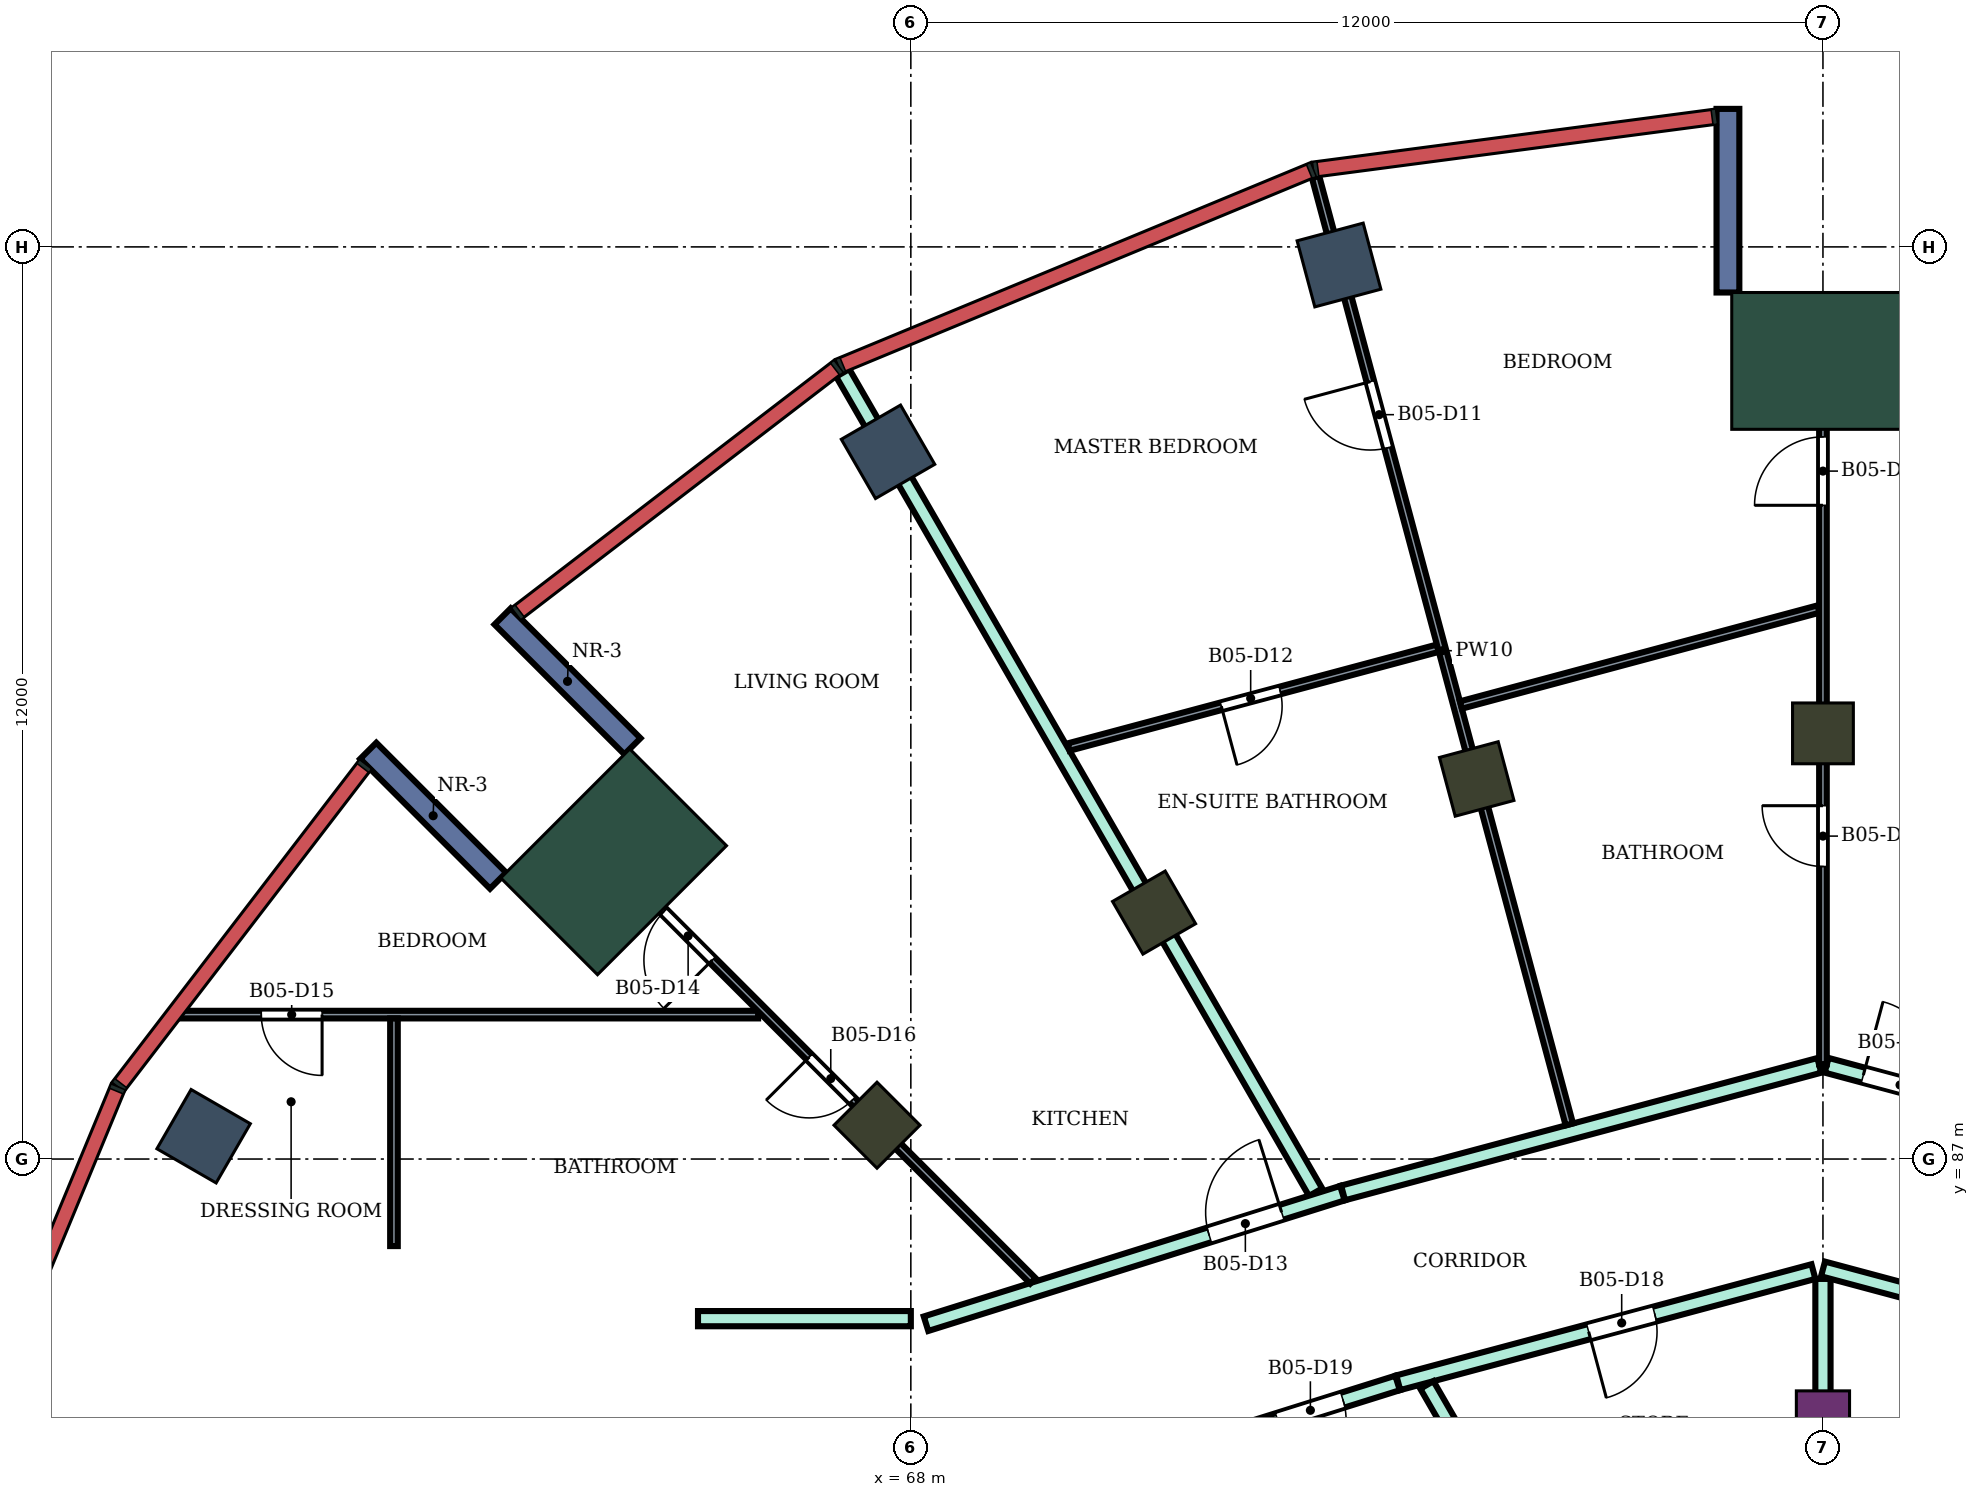
"""IFC4 building model, lengths in metres.
Left out: names, types, materials, properties, quantities, classifications, styles, units other than length and angle.
Written with IfcOpenShell. Run it as: python <this file> out.ifc"""

import sys

from ifc_helpers import new_model, si_unit, direction, frame, frame_2d, origin, origin_2d, place, context, subcontext, project, spatial, rectangle, extrude, element, fill, save


model = new_model("IFC4")
c1 = context("Model", 3, precision=1e-05, world=origin(), true_north=direction((0.0, 1.0)))
c2 = subcontext(c1, "Body", "Model", "MODEL_VIEW")
j1 = project(units=[si_unit("LENGTHUNIT", "METRE"), si_unit("PLANEANGLEUNIT", "RADIAN")], contexts=[c1])
p1 = place(None, origin())
s1 = spatial("IfcSite", under=j1, at=p1, CompositionType="ELEMENT")
p2 = place(p1, origin())
s2 = spatial("IfcBuilding", under=s1, at=p2, CompositionType="ELEMENT")
p3 = place(p2, frame((0.0, 0.0, 266.7)))
s3 = spatial("IfcBuildingStorey", under=s2, at=p3, CompositionType="ELEMENT", Elevation=266.7)
for number, where, z_axis, x_axis in (
    (1, (73.633, 98.762, 0.0), (0.0, 0.0, 1.0), (-0.259, 0.966, 0.0)),
    (2, (67.7, 96.304, 0.0), (0.0, 0.0, 1.0), (-0.5, 0.866, 0.0)),
    (3, (58.696, 87.3, 0.0), (0.0, 0.0, 1.0), (-0.866, 0.5, 0.0)),
):
    element("IfcColumn", number, at=place(p3, frame(where, z_axis=z_axis, x_axis=x_axis)), inside=s3, PredefinedType="COLUMN", context=c2, shape_type="SweptSolid", body=[
        extrude(rectangle(XDim=0.9, YDim=0.9, at=origin_2d()), origin(), (0.0, 0.0, 1.0), 4.2),
    ])
for number, where, z_axis, x_axis in (
    (4, (80.0, 92.6, 0.0), (0.0, 0.0, 1.0), (0.0, 1.0, 0.0)),
    (5, (75.445, 92.0, 0.0), (0.0, 0.0, 1.0), (-0.259, 0.966, 0.0)),
    (6, (71.2, 90.242, 0.0), (0.0, 0.0, 1.0), (-0.5, 0.866, 0.0)),
    (7, (67.555, 87.445, 0.0), (0.0, 0.0, 1.0), (-0.707, 0.707, 0.0)),
):
    element("IfcColumn", number, at=place(p3, frame(where, z_axis=z_axis, x_axis=x_axis)), inside=s3, PredefinedType="COLUMN", context=c2, shape_type="SweptSolid", body=[
        extrude(rectangle(XDim=0.8, YDim=0.8, at=origin_2d()), origin(), (0.0, 0.0, 1.0), 4.2),
    ])
p4 = place(p3, frame((80.0, 83.6, 0.0), z_axis=(0.0, 0.0, 1.0), x_axis=(0.0, 1.0, 0.0)))
e8 = element("IfcColumn", 8, at=p4, inside=s3, PredefinedType="COLUMN", context=c2, shape_type="SweptSolid", body=[
    extrude(rectangle(XDim=0.7, YDim=0.7, at=origin_2d()), origin(), (0.0, 0.0, 1.0), 4.2),
])
for number, where, z_axis, x_axis in (
    (9, (80.0, 97.5, 0.0), (0.0, 0.0, 1.0), (0.0, 1.0, 0.0)),
    (10, (64.09, 90.91, 0.0), (0.0, 0.0, 1.0), (-0.707, 0.707, 0.0)),
):
    element("IfcColumn", number, at=place(p3, frame(where, z_axis=z_axis, x_axis=x_axis)), inside=s3, PredefinedType="COLUMN", context=c2, shape_type="SweptSolid", body=[
        extrude(rectangle(XDim=1.8, YDim=2.4, at=origin_2d()), origin(), (0.0, 0.0, 1.0), 4.2),
    ])
for number, where, z_axis, x_axis in (
    (11, (78.75, 98.4, 0.0), (0.0, 0.0, 1.0), (0.0, 1.0, 0.0)),
    (12, (64.338, 92.43, 0.0), (0.0, 0.0, 1.0), (-0.707, 0.707, 0.0)),
    (13, (62.57, 90.662, 0.0), (0.0, 0.0, 1.0), (-0.707, 0.707, 0.0)),
):
    element("IfcWall", number, at=place(p3, frame(where, z_axis=z_axis, x_axis=x_axis)), inside=s3, PredefinedType="NOTDEFINED", context=c2, shape_type="SweptSolid", body=[
        extrude(rectangle(XDim=2.416, YDim=0.3, at=frame_2d((1.208, 0.0))), origin(), (0.0, 0.0, 1.0), 4.2),
    ])
p5 = place(p3, frame((65.2, 84.9, 0.0), z_axis=(0.0, 0.0, 1.0), x_axis=(1.0, 0.0, 0.0)))
e14 = element("IfcWall", 14, at=p5, inside=s3, PredefinedType="PARTITIONING", context=c2, shape_type="SweptSolid", body=[
    extrude(rectangle(XDim=2.8, YDim=0.2, at=frame_2d((1.4, 0.0))), origin(), (0.0, 0.0, 1.0), 3.75),
])
p6 = place(p3, frame((67.104, 97.343, 0.0), z_axis=(0.0, 0.0, 1.0), x_axis=(0.499894524629, -0.866086291455, 0.0)))
e15 = element("IfcWall", 15, at=p6, inside=s3, PredefinedType="PARTITIONING", context=c2, shape_type="SweptSolid", body=[
    extrude(rectangle(XDim=12.446, YDim=0.2, at=frame_2d((6.223, 0.0))), origin(), (0.0, 0.0, 1.0), 3.75),
])
p7 = place(p3, frame((68.2, 84.833, 0.0), z_axis=(0.0, 0.0, 1.0), x_axis=(0.954204109499, 0.299156342762, 0.0)))
e16 = element("IfcWall", 16, at=p7, inside=s3, PredefinedType="PARTITIONING", context=c2, shape_type="SweptSolid", body=[
    extrude(rectangle(XDim=5.74, YDim=0.2, at=frame_2d((2.87, 0.0))), origin(), (0.0, 0.0, 1.0), 3.75),
])
p8 = place(p7, frame((3.903, 0.0, 0.0)))
e17 = element("IfcOpeningElement", 17, at=p8, cuts=e16, PredefinedType="OPENING", context=c2, shape_type="SweptSolid", body=[
    extrude(rectangle(XDim=1.0, YDim=2.1, at=frame_2d((0.5, 1.05))), frame((0.0, 0.11, 0.0), z_axis=(0.0, -1.0, 0.0), x_axis=(1.0, 0.0, 0.0)), (0.0, 0.0, 1.0), 0.22),
])
p9 = place(p3, frame((72.1, 83.332, 0.0), z_axis=(0.0, 0.0, 1.0), x_axis=(0.954233106619, 0.299063836383, 0.0)))
e18 = element("IfcWall", 18, at=p9, inside=s3, PredefinedType="PARTITIONING", context=c2, shape_type="SweptSolid", body=[
    extrude(rectangle(XDim=2.414, YDim=0.2, at=frame_2d((1.207, 0.0))), origin(), (0.0, 0.0, 1.0), 3.75),
])
p10 = place(p9, frame((0.762, 0.0, 0.0)))
e19 = element("IfcOpeningElement", 19, at=p10, cuts=e18, PredefinedType="OPENING", context=c2, shape_type="SweptSolid", body=[
    extrude(rectangle(XDim=0.9, YDim=2.1, at=frame_2d((0.45, 1.05))), frame((0.0, 0.11, 0.0), z_axis=(0.0, -1.0, 0.0), x_axis=(1.0, 0.0, 0.0)), (0.0, 0.0, 1.0), 0.22),
])
p11 = place(p3, frame((73.687, 86.554, 0.0), z_axis=(0.0, 0.0, 1.0), x_axis=(0.965961994098, 0.258684027257, 0.0)))
e20 = element("IfcWall", 20, at=p11, inside=s3, PredefinedType="PARTITIONING", context=c2, shape_type="SweptSolid", body=[
    extrude(rectangle(XDim=6.486, YDim=0.2, at=frame_2d((3.243, 0.0))), origin(), (0.0, 0.0, 1.0), 3.75),
])
p12 = place(p3, frame((74.413, 84.057, 0.0), z_axis=(0.0, 0.0, 1.0), x_axis=(0.965972135939, 0.258646153246, 0.0)))
e21 = element("IfcWall", 21, at=p12, inside=s3, PredefinedType="PARTITIONING", context=c2, shape_type="SweptSolid", body=[
    extrude(rectangle(XDim=5.654, YDim=0.2, at=frame_2d((2.827, 0.0))), origin(), (0.0, 0.0, 1.0), 3.75),
])
p13 = place(p12, frame((2.593, 0.0, 0.0)))
e22 = element("IfcOpeningElement", 22, at=p13, cuts=e21, PredefinedType="OPENING", context=c2, shape_type="SweptSolid", body=[
    extrude(rectangle(XDim=0.9, YDim=2.1, at=frame_2d((0.45, 1.05))), frame((0.0, 0.11, 0.0), z_axis=(0.0, -1.0, 0.0), x_axis=(1.0, 0.0, 0.0)), (0.0, 0.0, 1.0), 0.22),
])
p14 = place(p3, frame((74.789, 84.028, 0.0), z_axis=(0.0, 0.0, 1.0), x_axis=(0.499905962189, -0.866079689733, 0.0)))
e23 = element("IfcWall", 23, at=p14, inside=s3, PredefinedType="PARTITIONING", context=c2, shape_type="SweptSolid", body=[
    extrude(rectangle(XDim=2.726, YDim=0.2, at=frame_2d((1.363, 0.0))), origin(), (0.0, 0.0, 1.0), 3.75),
])
p15 = place(p3, frame((80.0, 82.7, 0.0), z_axis=(0.0, 0.0, 1.0), x_axis=(0.0, 1.0, 0.0)))
e24 = element("IfcWall", 24, at=p15, inside=s3, PredefinedType="PARTITIONING", context=c2, shape_type="SweptSolid", body=[
    extrude(rectangle(XDim=2.723, YDim=0.2, at=frame_2d((1.362, 0.0))), origin(), (0.0, 0.0, 1.0), 3.75),
])
p16 = place(p3, frame((80.048, 88.233, 0.0), z_axis=(0.0, 0.0, 1.0), x_axis=(0.965867917069, -0.259035068625, 0.0)))
e25 = element("IfcWall", 25, at=p16, inside=s3, PredefinedType="PARTITIONING", context=c2, shape_type="SweptSolid", body=[
    extrude(rectangle(XDim=6.476, YDim=0.2, at=frame_2d((3.238, 0.0))), origin(), (0.0, 0.0, 1.0), 3.75),
])
p17 = place(p16, frame((0.5, 0.0, 0.0)))
e26 = element("IfcOpeningElement", 26, at=p17, cuts=e25, PredefinedType="OPENING", context=c2, shape_type="SweptSolid", body=[
    extrude(rectangle(XDim=1.0, YDim=2.1, at=frame_2d((0.5, 1.05))), frame((0.0, 0.11, 0.0), z_axis=(0.0, -1.0, 0.0), x_axis=(1.0, 0.0, 0.0)), (0.0, 0.0, 1.0), 0.22),
])
p18 = place(p3, frame((80.001, 85.554, 0.0), z_axis=(0.0, 0.0, 1.0), x_axis=(0.965917658836, -0.258849524528, 0.0)))
e27 = element("IfcWall", 27, at=p18, inside=s3, PredefinedType="PARTITIONING", context=c2, shape_type="SweptSolid", body=[
    extrude(rectangle(XDim=5.773, YDim=0.2, at=frame_2d((2.887, 0.0))), origin(), (0.0, 0.0, 1.0), 3.75),
])
p19 = place(p18, frame((1.991, 0.0, 0.0)))
e28 = element("IfcOpeningElement", 28, at=p19, cuts=e27, PredefinedType="OPENING", context=c2, shape_type="SweptSolid", body=[
    extrude(rectangle(XDim=1.8, YDim=2.1, at=frame_2d((0.9, 1.05))), frame((0.0, 0.11, 0.0), z_axis=(0.0, -1.0, 0.0), x_axis=(1.0, 0.0, 0.0)), (0.0, 0.0, 1.0), 0.22),
])
p20 = place(p3, frame((58.379, 88.9, 0.0), z_axis=(0.0, 0.0, 1.0), x_axis=(1.0, 0.0, 0.0)))
e29 = element("IfcWall", 29, at=p20, inside=s3, PredefinedType="PARTITIONING", context=c2, shape_type="SweptSolid", body=[
    extrude(rectangle(XDim=7.612, YDim=0.1, at=frame_2d((3.806, 0.0))), origin(), (0.0, 0.0, 1.0), 3.75),
])
p21 = place(p20, frame((1.075, 0.0, 0.0)))
e30 = element("IfcOpeningElement", 30, at=p21, cuts=e29, PredefinedType="OPENING", context=c2, shape_type="SweptSolid", body=[
    extrude(rectangle(XDim=0.8, YDim=2.1, at=frame_2d((0.4, 1.05))), frame((0.0, 0.06, 0.0), z_axis=(0.0, -1.0, 0.0), x_axis=(1.0, 0.0, 0.0)), (0.0, 0.0, 1.0), 0.12),
])
p22 = place(p3, frame((61.2, 85.855, 0.0), z_axis=(0.0, 0.0, 1.0), x_axis=(0.0, 1.0, 0.0)))
e31 = element("IfcWall", 31, at=p22, inside=s3, PredefinedType="PARTITIONING", context=c2, shape_type="SweptSolid", body=[
    extrude(rectangle(XDim=2.995, YDim=0.1, at=frame_2d((1.498, 0.0))), origin(), (0.0, 0.0, 1.0), 3.75),
])
p23 = place(p3, frame((63.598, 91.408, 0.0), z_axis=(0.0, 0.0, 1.0), x_axis=(0.706905682311, -0.707307822886, 0.0)))
e32 = element("IfcWall", 32, at=p23, inside=s3, PredefinedType="PARTITIONING", context=c2, shape_type="SweptSolid", body=[
    extrude(rectangle(XDim=8.5, YDim=0.1, at=frame_2d((4.25, 0.0))), origin(), (0.0, 0.0, 1.0), 3.75),
])
p24 = place(p23, frame((1.632, 0.0, 0.0)))
e33 = element("IfcOpeningElement", 33, at=p24, cuts=e32, PredefinedType="OPENING", context=c2, shape_type="SweptSolid", body=[
    extrude(rectangle(XDim=0.9, YDim=2.1, at=frame_2d((0.45, 1.05))), frame((0.0, 0.06, 0.0), z_axis=(0.0, -1.0, 0.0), x_axis=(1.0, 0.0, 0.0)), (0.0, 0.0, 1.0), 0.12),
])
p25 = place(p23, frame((4.336, 0.0, 0.0)))
e34 = element("IfcOpeningElement", 34, at=p25, cuts=e32, PredefinedType="OPENING", context=c2, shape_type="SweptSolid", body=[
    extrude(rectangle(XDim=0.8, YDim=2.1, at=frame_2d((0.4, 1.05))), frame((0.0, 0.06, 0.0), z_axis=(0.0, -1.0, 0.0), x_axis=(1.0, 0.0, 0.0)), (0.0, 0.0, 1.0), 0.12),
])
p26 = place(p3, frame((70.077, 92.42, 0.0), z_axis=(0.0, 0.0, 1.0), x_axis=(0.965977307762, 0.258626837138, 0.0)))
e35 = element("IfcWall", 35, at=p26, inside=s3, PredefinedType="PARTITIONING", context=c2, shape_type="SweptSolid", body=[
    extrude(rectangle(XDim=5.027, YDim=0.1, at=frame_2d((2.513, 0.0))), origin(), (0.0, 0.0, 1.0), 3.75),
])
p27 = place(p26, frame((2.078, 0.0, 0.0)))
e36 = element("IfcOpeningElement", 36, at=p27, cuts=e35, PredefinedType="OPENING", context=c2, shape_type="SweptSolid", body=[
    extrude(rectangle(XDim=0.8, YDim=2.1, at=frame_2d((0.4, 1.05))), frame((0.0, 0.06, 0.0), z_axis=(0.0, -1.0, 0.0), x_axis=(1.0, 0.0, 0.0)), (0.0, 0.0, 1.0), 0.12),
])
p28 = place(p3, frame((73.325, 99.92, 0.0), z_axis=(0.0, 0.0, 1.0), x_axis=(0.258732932804, -0.965948895896, 0.0)))
e37 = element("IfcWall", 37, at=p28, inside=s3, PredefinedType="PARTITIONING", context=c2, shape_type="SweptSolid", body=[
    extrude(rectangle(XDim=12.904, YDim=0.1, at=frame_2d((6.452, 0.0))), origin(), (0.0, 0.0, 1.0), 3.75),
])
p29 = place(p28, frame((2.787, 0.0, 0.0)))
e38 = element("IfcOpeningElement", 38, at=p29, cuts=e37, PredefinedType="OPENING", context=c2, shape_type="SweptSolid", body=[
    extrude(rectangle(XDim=0.9, YDim=2.1, at=frame_2d((0.45, 1.05))), frame((0.0, 0.06, 0.0), z_axis=(0.0, -1.0, 0.0), x_axis=(1.0, 0.0, 0.0)), (0.0, 0.0, 1.0), 0.12),
])
p30 = place(p3, frame((75.236, 92.973, 0.0), z_axis=(0.0, 0.0, 1.0), x_axis=(0.965831212389, 0.259171891173, 0.0)))
e39 = element("IfcWall", 39, at=p30, inside=s3, PredefinedType="PARTITIONING", context=c2, shape_type="SweptSolid", body=[
    extrude(rectangle(XDim=4.872, YDim=0.1, at=frame_2d((2.436, 0.0))), origin(), (0.0, 0.0, 1.0), 3.75),
])
p31 = place(p3, frame((80.0, 88.246, 0.0), z_axis=(0.0, 0.0, 1.0), x_axis=(0.0, 1.0, 0.0)))
e40 = element("IfcWall", 40, at=p31, inside=s3, PredefinedType="PARTITIONING", context=c2, shape_type="SweptSolid", body=[
    extrude(rectangle(XDim=9.954, YDim=0.1, at=frame_2d((4.977, 0.0))), origin(), (0.0, 0.0, 1.0), 3.75),
])
p32 = place(p31, frame((7.354, 0.0, 0.0)))
e41 = element("IfcOpeningElement", 41, at=p32, cuts=e40, PredefinedType="OPENING", context=c2, shape_type="SweptSolid", body=[
    extrude(rectangle(XDim=0.9, YDim=2.1, at=frame_2d((0.45, 1.05))), frame((0.0, 0.06, 0.0), z_axis=(0.0, -1.0, 0.0), x_axis=(1.0, 0.0, 0.0)), (0.0, 0.0, 1.0), 0.12),
])
p33 = place(p31, frame((2.603, 0.0, 0.0)))
e42 = element("IfcOpeningElement", 42, at=p33, cuts=e40, PredefinedType="OPENING", context=c2, shape_type="SweptSolid", body=[
    extrude(rectangle(XDim=0.8, YDim=2.1, at=frame_2d((0.4, 1.05))), frame((0.0, 0.06, 0.0), z_axis=(0.0, -1.0, 0.0), x_axis=(1.0, 0.0, 0.0)), (0.0, 0.0, 1.0), 0.12),
])
p34 = place(p17, origin())
e43 = element("IfcDoor", 43, at=p34, inside=s3, OperationType="SINGLE_SWING_LEFT", PredefinedType="DOOR", context=c2, shape_type="SweptSolid", body=[
    extrude(rectangle(XDim=1.0, YDim=2.1, at=frame_2d((0.5, 1.05))), frame((0.0, 0.025, 0.0), z_axis=(0.0, -1.0, 0.0), x_axis=(1.0, 0.0, 0.0)), (0.0, 0.0, 1.0), 0.05),
])
fill(e26, e43)
p35 = place(p32, origin())
e44 = element("IfcDoor", 44, at=p35, inside=s3, OperationType="SINGLE_SWING_LEFT", PredefinedType="DOOR", context=c2, shape_type="SweptSolid", body=[
    extrude(rectangle(XDim=0.9, YDim=2.1, at=frame_2d((0.45, 1.05))), frame((0.0, 0.025, 0.0), z_axis=(0.0, -1.0, 0.0), x_axis=(1.0, 0.0, 0.0)), (0.0, 0.0, 1.0), 0.05),
])
fill(e41, e44)
p36 = place(p33, origin())
e45 = element("IfcDoor", 45, at=p36, inside=s3, OperationType="SINGLE_SWING_RIGHT", PredefinedType="DOOR", context=c2, shape_type="SweptSolid", body=[
    extrude(rectangle(XDim=0.8, YDim=2.1, at=frame_2d((0.4, 1.05))), frame((0.0, 0.025, 0.0), z_axis=(0.0, -1.0, 0.0), x_axis=(1.0, 0.0, 0.0)), (0.0, 0.0, 1.0), 0.05),
])
fill(e42, e45)
p37 = place(p29, frame((0.9, 0.0, 0.0), z_axis=(0.0, 0.0, 1.0), x_axis=(-1.0, 0.0, 0.0)))
e46 = element("IfcDoor", 46, at=p37, inside=s3, OperationType="SINGLE_SWING_RIGHT", PredefinedType="DOOR", context=c2, shape_type="SweptSolid", body=[
    extrude(rectangle(XDim=0.9, YDim=2.1, at=frame_2d((0.45, 1.05))), frame((0.0, 0.025, 0.0), z_axis=(0.0, -1.0, 0.0), x_axis=(1.0, 0.0, 0.0)), (0.0, 0.0, 1.0), 0.05),
])
fill(e38, e46)
p38 = place(p27, frame((0.8, 0.0, 0.0), z_axis=(0.0, 0.0, 1.0), x_axis=(-1.0, 0.0, 0.0)))
e47 = element("IfcDoor", 47, at=p38, inside=s3, OperationType="SINGLE_SWING_RIGHT", PredefinedType="DOOR", context=c2, shape_type="SweptSolid", body=[
    extrude(rectangle(XDim=0.8, YDim=2.1, at=frame_2d((0.4, 1.05))), frame((0.0, 0.025, 0.0), z_axis=(0.0, -1.0, 0.0), x_axis=(1.0, 0.0, 0.0)), (0.0, 0.0, 1.0), 0.05),
])
fill(e36, e47)
p39 = place(p8, origin())
e48 = element("IfcDoor", 48, at=p39, inside=s3, OperationType="SINGLE_SWING_RIGHT", PredefinedType="DOOR", context=c2, shape_type="SweptSolid", body=[
    extrude(rectangle(XDim=1.0, YDim=2.1, at=frame_2d((0.5, 1.05))), frame((0.0, 0.025, 0.0), z_axis=(0.0, -1.0, 0.0), x_axis=(1.0, 0.0, 0.0)), (0.0, 0.0, 1.0), 0.05),
])
fill(e17, e48)
p40 = place(p24, frame((0.9, 0.0, 0.0), z_axis=(0.0, 0.0, 1.0), x_axis=(-1.0, 0.0, 0.0)))
e49 = element("IfcDoor", 49, at=p40, inside=s3, OperationType="SINGLE_SWING_LEFT", PredefinedType="DOOR", context=c2, shape_type="SweptSolid", body=[
    extrude(rectangle(XDim=0.9, YDim=2.1, at=frame_2d((0.45, 1.05))), frame((0.0, 0.025, 0.0), z_axis=(0.0, -1.0, 0.0), x_axis=(1.0, 0.0, 0.0)), (0.0, 0.0, 1.0), 0.05),
])
fill(e33, e49)
p41 = place(p21, frame((0.8, 0.0, 0.0), z_axis=(0.0, 0.0, 1.0), x_axis=(-1.0, 0.0, 0.0)))
e50 = element("IfcDoor", 50, at=p41, inside=s3, OperationType="SINGLE_SWING_LEFT", PredefinedType="DOOR", context=c2, shape_type="SweptSolid", body=[
    extrude(rectangle(XDim=0.8, YDim=2.1, at=frame_2d((0.4, 1.05))), frame((0.0, 0.025, 0.0), z_axis=(0.0, -1.0, 0.0), x_axis=(1.0, 0.0, 0.0)), (0.0, 0.0, 1.0), 0.05),
])
fill(e30, e50)
p42 = place(p25, frame((0.8, 0.0, 0.0), z_axis=(0.0, 0.0, 1.0), x_axis=(-1.0, 0.0, 0.0)))
e51 = element("IfcDoor", 51, at=p42, inside=s3, OperationType="SINGLE_SWING_RIGHT", PredefinedType="DOOR", context=c2, shape_type="SweptSolid", body=[
    extrude(rectangle(XDim=0.8, YDim=2.1, at=frame_2d((0.4, 1.05))), frame((0.0, 0.025, 0.0), z_axis=(0.0, -1.0, 0.0), x_axis=(1.0, 0.0, 0.0)), (0.0, 0.0, 1.0), 0.05),
])
fill(e34, e51)
p43 = place(p13, frame((0.9, 0.0, 0.0), z_axis=(0.0, 0.0, 1.0), x_axis=(-1.0, 0.0, 0.0)))
e52 = element("IfcDoor", 52, at=p43, inside=s3, OperationType="SINGLE_SWING_RIGHT", PredefinedType="DOOR", context=c2, shape_type="SweptSolid", body=[
    extrude(rectangle(XDim=0.9, YDim=2.1, at=frame_2d((0.45, 1.05))), frame((0.0, 0.025, 0.0), z_axis=(0.0, -1.0, 0.0), x_axis=(1.0, 0.0, 0.0)), (0.0, 0.0, 1.0), 0.05),
])
fill(e22, e52)
p44 = place(p10, frame((0.9, 0.0, 0.0), z_axis=(0.0, 0.0, 1.0), x_axis=(-1.0, 0.0, 0.0)))
e53 = element("IfcDoor", 53, at=p44, inside=s3, OperationType="SINGLE_SWING_RIGHT", PredefinedType="DOOR", context=c2, shape_type="SweptSolid", body=[
    extrude(rectangle(XDim=0.9, YDim=2.1, at=frame_2d((0.45, 1.05))), frame((0.0, 0.025, 0.0), z_axis=(0.0, -1.0, 0.0), x_axis=(1.0, 0.0, 0.0)), (0.0, 0.0, 1.0), 0.05),
])
fill(e19, e53)
save(model, sys.argv[1])
